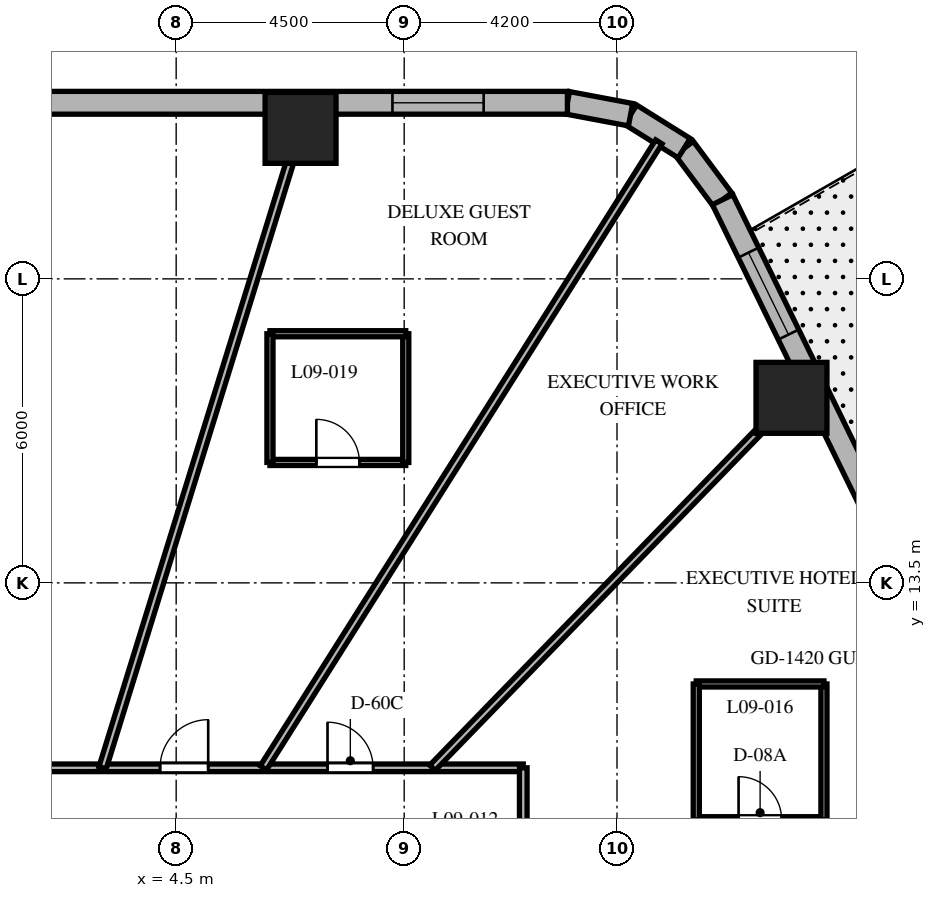
"""IFC4 building model, lengths in metres.
Left out: names, types, materials, properties, quantities, classifications, styles, units other than length and angle.
Written with IfcOpenShell. Run it as: python <this file> out.ifc"""

import sys

from ifc_helpers import new_model, si_unit, direction, frame, frame_2d, origin, origin_2d, place, context, subcontext, project, spatial, rectangle, extrude, element, fill, save


model = new_model("IFC4")
c1 = context("Model", 3, precision=1e-05, world=origin(), true_north=direction((0.0, 1.0)))
c2 = subcontext(c1, "Body", "Model", "MODEL_VIEW")
j1 = project(units=[si_unit("LENGTHUNIT", "METRE"), si_unit("PLANEANGLEUNIT", "RADIAN")], contexts=[c1])
p1 = place(None, origin())
s1 = spatial("IfcSite", under=j1, at=p1, CompositionType="ELEMENT")
p2 = place(p1, origin())
s2 = spatial("IfcBuilding", under=s1, at=p2, CompositionType="ELEMENT")
p3 = place(p2, frame((0.0, 0.0, 45.3)))
s3 = spatial("IfcBuildingStorey", under=s2, at=p3, CompositionType="ELEMENT", Elevation=45.3)
for number, where, z_axis, x_axis in (
    (1, (16.643, 17.152, 0.0), (0.0, 0.0, 1.0), (1.0, 0.0, 0.0)),
    (2, (6.955, 22.48, 0.0), (0.0, 0.0, 1.0), (1.0, 0.0, 0.0)),
):
    element("IfcColumn", number, at=place(p3, frame(where, z_axis=z_axis, x_axis=x_axis)), inside=s3, PredefinedType="COLUMN", context=c2, shape_type="SweptSolid", body=[
        extrude(rectangle(XDim=1.4, YDim=1.4, at=origin_2d()), origin(), (0.0, 0.0, 1.0), 3.7),
    ])
p4 = place(p3, frame((15.284, 21.062, 0.0), z_axis=(0.0, 0.0, 1.0), x_axis=(-0.597595366449, 0.801797841104, 0.0)))
e3 = element("IfcWall", 3, at=p4, inside=s3, PredefinedType="SOLIDWALL", context=c2, shape_type="SweptSolid", body=[
    extrude(rectangle(XDim=1.269, YDim=0.45, at=frame_2d((0.634, 0.0))), origin(), (0.0, 0.0, 1.0), 3.4),
])
p5 = place(p3, frame((14.526, 22.08, 0.0), z_axis=(0.0, 0.0, 1.0), x_axis=(-0.848185203596, 0.529699783275, 0.0)))
e4 = element("IfcWall", 4, at=p5, inside=s3, PredefinedType="SOLIDWALL", context=c2, shape_type="SweptSolid", body=[
    extrude(rectangle(XDim=1.247, YDim=0.45, at=frame_2d((0.624, 0.0))), origin(), (0.0, 0.0, 1.0), 3.4),
])
p6 = place(p3, frame((13.468, 22.74, 0.0), z_axis=(0.0, 0.0, 1.0), x_axis=(-0.982717174228, 0.185113358451, 0.0)))
e5 = element("IfcWall", 5, at=p6, inside=s3, PredefinedType="SOLIDWALL", context=c2, shape_type="SweptSolid", body=[
    extrude(rectangle(XDim=1.269, YDim=0.45, at=frame_2d((0.634, 0.0))), origin(), (0.0, 0.0, 1.0), 3.4),
])
p7 = place(p3, frame((24.336, 2.532, 0.0), z_axis=(0.0, 0.0, 1.0), x_axis=(-0.438931326393, 0.898520612291, 0.0)))
e6 = element("IfcWall", 6, at=p7, inside=s3, PredefinedType="SOLIDWALL", context=c2, shape_type="SweptSolid", body=[
    extrude(rectangle(XDim=20.623, YDim=0.45, at=frame_2d((10.312, 0.0))), origin(), (0.0, 0.0, 1.0), 3.4),
])
p8 = place(p7, frame((5.171, 0.0, 0.0)))
e7 = element("IfcOpeningElement", 7, at=p8, cuts=e6, PredefinedType="OPENING", context=c2, shape_type="SweptSolid", body=[
    extrude(rectangle(XDim=1.0, YDim=2.15, at=frame_2d((0.5, 1.075))), frame((0.0, 0.235, 0.0), z_axis=(0.0, -1.0, 0.0), x_axis=(1.0, 0.0, 0.0)), (0.0, 0.0, 1.0), 0.47),
])
p9 = place(p7, frame((1.214, 0.0, 0.8)))
e8 = element("IfcOpeningElement", 8, at=p9, cuts=e6, PredefinedType="OPENING", context=c2, shape_type="SweptSolid", body=[
    extrude(rectangle(XDim=1.8, YDim=1.8, at=frame_2d((0.9, 0.9))), frame((0.0, 0.235, 0.0), z_axis=(0.0, -1.0, 0.0), x_axis=(1.0, 0.0, 0.0)), (0.0, 0.0, 1.0), 0.47),
])
p10 = place(p7, frame((9.462, 0.0, 0.8)))
e9 = element("IfcOpeningElement", 9, at=p10, cuts=e6, PredefinedType="OPENING", context=c2, shape_type="SweptSolid", body=[
    extrude(rectangle(XDim=1.8, YDim=1.8, at=frame_2d((0.9, 0.9))), frame((0.0, 0.235, 0.0), z_axis=(0.0, -1.0, 0.0), x_axis=(1.0, 0.0, 0.0)), (0.0, 0.0, 1.0), 0.47),
])
p11 = place(p7, frame((17.66, 0.0, 0.8)))
e10 = element("IfcOpeningElement", 10, at=p11, cuts=e6, PredefinedType="OPENING", context=c2, shape_type="SweptSolid", body=[
    extrude(rectangle(XDim=1.8, YDim=1.8, at=frame_2d((0.9, 0.9))), frame((0.0, 0.235, 0.0), z_axis=(0.0, -1.0, 0.0), x_axis=(1.0, 0.0, 0.0)), (0.0, 0.0, 1.0), 0.47),
])
p12 = place(p3, frame((12.221, 22.975, 0.0), z_axis=(0.0, 0.0, 1.0), x_axis=(-1.0, 0.0, 0.0)))
e11 = element("IfcWall", 11, at=p12, inside=s3, PredefinedType="SOLIDWALL", context=c2, shape_type="SweptSolid", body=[
    extrude(rectangle(XDim=26.389, YDim=0.45, at=frame_2d((13.195, 0.0))), origin(), (0.0, 0.0, 1.0), 3.4),
])
p13 = place(p12, frame((1.653, 0.0, 0.8)))
e12 = element("IfcOpeningElement", 12, at=p13, cuts=e11, PredefinedType="OPENING", context=c2, shape_type="SweptSolid", body=[
    extrude(rectangle(XDim=1.8, YDim=1.8, at=frame_2d((0.9, 0.9))), frame((0.0, 0.235, 0.0), z_axis=(0.0, -1.0, 0.0), x_axis=(1.0, 0.0, 0.0)), (0.0, 0.0, 1.0), 0.47),
])
p14 = place(p12, frame((12.296, 0.0, 0.8)))
e13 = element("IfcOpeningElement", 13, at=p14, cuts=e11, PredefinedType="OPENING", context=c2, shape_type="SweptSolid", body=[
    extrude(rectangle(XDim=1.8, YDim=1.8, at=frame_2d((0.9, 0.9))), frame((0.0, 0.235, 0.0), z_axis=(0.0, -1.0, 0.0), x_axis=(1.0, 0.0, 0.0)), (0.0, 0.0, 1.0), 0.47),
])
p15 = place(p12, frame((22.938, 0.0, 0.8)))
e14 = element("IfcOpeningElement", 14, at=p15, cuts=e11, PredefinedType="OPENING", context=c2, shape_type="SweptSolid", body=[
    extrude(rectangle(XDim=1.8, YDim=1.8, at=frame_2d((0.9, 0.9))), frame((0.0, 0.235, 0.0), z_axis=(0.0, -1.0, 0.0), x_axis=(1.0, 0.0, 0.0)), (0.0, 0.0, 1.0), 0.47),
])
p16 = place(p3, frame((-11.35, 9.85, 0.0), z_axis=(0.0, 0.0, 1.0), x_axis=(1.0, 0.0, 0.0)))
e15 = element("IfcWall", 15, at=p16, inside=s3, PredefinedType="PARTITIONING", context=c2, shape_type="SweptSolid", body=[
    extrude(rectangle(XDim=22.7, YDim=0.15, at=frame_2d((11.35, 0.0))), origin(), (0.0, 0.0, 1.0), 2.84),
])
p17 = place(p16, frame((18.837, 0.0, 0.0)))
e16 = element("IfcOpeningElement", 16, at=p17, cuts=e15, PredefinedType="OPENING", context=c2, shape_type="SweptSolid", body=[
    extrude(rectangle(XDim=0.9, YDim=2.03, at=frame_2d((0.45, 1.015))), frame((0.0, 0.085, 0.0), z_axis=(0.0, -1.0, 0.0), x_axis=(1.0, 0.0, 0.0)), (0.0, 0.0, 1.0), 0.17),
])
p18 = place(p16, frame((15.532, 0.0, 0.0)))
e17 = element("IfcOpeningElement", 17, at=p18, cuts=e15, PredefinedType="OPENING", context=c2, shape_type="SweptSolid", body=[
    extrude(rectangle(XDim=0.95, YDim=2.03, at=frame_2d((0.475, 1.015))), frame((0.0, 0.085, 0.0), z_axis=(0.0, -1.0, 0.0), x_axis=(1.0, 0.0, 0.0)), (0.0, 0.0, 1.0), 0.17),
])
p19 = place(p16, frame((10.444, 0.0, 0.0)))
e18 = element("IfcOpeningElement", 18, at=p19, cuts=e15, PredefinedType="OPENING", context=c2, shape_type="SweptSolid", body=[
    extrude(rectangle(XDim=0.95, YDim=2.03, at=frame_2d((0.475, 1.015))), frame((0.0, 0.085, 0.0), z_axis=(0.0, -1.0, 0.0), x_axis=(1.0, 0.0, 0.0)), (0.0, 0.0, 1.0), 0.17),
])
p20 = place(p16, frame((5.252, 0.0, 0.0)))
e19 = element("IfcOpeningElement", 19, at=p20, cuts=e15, PredefinedType="OPENING", context=c2, shape_type="SweptSolid", body=[
    extrude(rectangle(XDim=0.95, YDim=2.03, at=frame_2d((0.475, 1.015))), frame((0.0, 0.085, 0.0), z_axis=(0.0, -1.0, 0.0), x_axis=(1.0, 0.0, 0.0)), (0.0, 0.0, 1.0), 0.17),
])
p21 = place(p16, frame((1.702, 0.0, 0.0)))
e20 = element("IfcOpeningElement", 20, at=p21, cuts=e15, PredefinedType="OPENING", context=c2, shape_type="SweptSolid", body=[
    extrude(rectangle(XDim=0.9, YDim=2.03, at=frame_2d((0.45, 1.015))), frame((0.0, 0.085, 0.0), z_axis=(0.0, -1.0, 0.0), x_axis=(1.0, 0.0, 0.0)), (0.0, 0.0, 1.0), 0.17),
])
p22 = place(p3, frame((11.35, 9.85, 0.0), z_axis=(0.0, 0.0, 1.0), x_axis=(0.0, -1.0, 0.0)))
e21 = element("IfcWall", 21, at=p22, inside=s3, PredefinedType="PARTITIONING", context=c2, shape_type="SweptSolid", body=[
    extrude(rectangle(XDim=19.7, YDim=0.15, at=frame_2d((9.85, 0.0))), origin(), (0.0, 0.0, 1.0), 2.84),
])
p23 = place(p22, frame((7.571, 0.0, 0.0)))
e22 = element("IfcOpeningElement", 22, at=p23, cuts=e21, PredefinedType="OPENING", context=c2, shape_type="SweptSolid", body=[
    extrude(rectangle(XDim=0.95, YDim=2.03, at=frame_2d((0.475, 1.015))), frame((0.0, 0.085, 0.0), z_axis=(0.0, -1.0, 0.0), x_axis=(1.0, 0.0, 0.0)), (0.0, 0.0, 1.0), 0.17),
])
p24 = place(p22, frame((3.024, 0.0, 0.0)))
e23 = element("IfcOpeningElement", 23, at=p24, cuts=e21, PredefinedType="OPENING", context=c2, shape_type="SweptSolid", body=[
    extrude(rectangle(XDim=0.95, YDim=2.03, at=frame_2d((0.475, 1.015))), frame((0.0, 0.085, 0.0), z_axis=(0.0, -1.0, 0.0), x_axis=(1.0, 0.0, 0.0)), (0.0, 0.0, 1.0), 0.17),
])
p25 = place(p22, frame((17.181, 0.0, 0.0)))
e24 = element("IfcOpeningElement", 24, at=p25, cuts=e21, PredefinedType="OPENING", context=c2, shape_type="SweptSolid", body=[
    extrude(rectangle(XDim=0.95, YDim=2.03, at=frame_2d((0.475, 1.015))), frame((0.0, 0.085, 0.0), z_axis=(0.0, -1.0, 0.0), x_axis=(1.0, 0.0, 0.0)), (0.0, 0.0, 1.0), 0.17),
])
p26 = place(p22, frame((13.403, 0.0, 0.0)))
e25 = element("IfcOpeningElement", 25, at=p26, cuts=e21, PredefinedType="OPENING", context=c2, shape_type="SweptSolid", body=[
    extrude(rectangle(XDim=0.95, YDim=2.03, at=frame_2d((0.475, 1.015))), frame((0.0, 0.085, 0.0), z_axis=(0.0, -1.0, 0.0), x_axis=(1.0, 0.0, 0.0)), (0.0, 0.0, 1.0), 0.17),
])
p27 = place(p22, frame((10.134, 0.0, 0.0)))
e26 = element("IfcOpeningElement", 26, at=p27, cuts=e21, PredefinedType="OPENING", context=c2, shape_type="SweptSolid", body=[
    extrude(rectangle(XDim=0.95, YDim=2.03, at=frame_2d((0.475, 1.015))), frame((0.0, 0.085, 0.0), z_axis=(0.0, -1.0, 0.0), x_axis=(1.0, 0.0, 0.0)), (0.0, 0.0, 1.0), 0.17),
])
p28 = place(p3, frame((9.558, 9.85, 0.0), z_axis=(0.0, 0.0, 1.0), x_axis=(0.69638346089, 0.717669893056, 0.0)))
e27 = element("IfcWall", 27, at=p28, inside=s3, PredefinedType="PARTITIONING", context=c2, shape_type="SweptSolid", body=[
    extrude(rectangle(XDim=10.701, YDim=0.15, at=frame_2d((5.351, 0.0))), origin(), (0.0, 0.0, 1.0), 2.54),
])
p29 = place(p3, frame((6.222, 9.85, 0.0), z_axis=(0.0, 0.0, 1.0), x_axis=(0.534069056435, 0.845440857162, 0.0)))
e28 = element("IfcWall", 28, at=p29, inside=s3, PredefinedType="PARTITIONING", context=c2, shape_type="SweptSolid", body=[
    extrude(rectangle(XDim=14.611, YDim=0.15, at=frame_2d((7.306, 0.0))), origin(), (0.0, 0.0, 1.0), 2.54),
])
p30 = place(p3, frame((3.048, 9.85, 0.0), z_axis=(0.0, 0.0, 1.0), x_axis=(0.295553992761, 0.955326037206, 0.0)))
e29 = element("IfcWall", 29, at=p30, inside=s3, PredefinedType="PARTITIONING", context=c2, shape_type="SweptSolid", body=[
    extrude(rectangle(XDim=13.739, YDim=0.15, at=frame_2d((6.869, 0.0))), origin(), (0.0, 0.0, 1.0), 2.54),
])
p31 = place(p3, frame((14.764, 8.825, 0.0), z_axis=(0.0, 0.0, 1.0), x_axis=(1.0, 0.0, 0.0)))
e30 = element("IfcWall", 30, at=p31, inside=s3, PredefinedType="PARTITIONING", context=c2, shape_type="SweptSolid", body=[
    extrude(rectangle(XDim=2.52, YDim=0.12, at=frame_2d((1.26, 0.0))), origin(), (0.0, 0.0, 1.0), 2.927),
])
p32 = place(p31, frame((0.835, 0.0, 0.0)))
e31 = element("IfcOpeningElement", 31, at=p32, cuts=e30, PredefinedType="OPENING", context=c2, shape_type="SweptSolid", body=[
    extrude(rectangle(XDim=0.85, YDim=2.03, at=frame_2d((0.425, 1.015))), frame((0.0, 0.07, 0.0), z_axis=(0.0, -1.0, 0.0), x_axis=(1.0, 0.0, 0.0)), (0.0, 0.0, 1.0), 0.14),
])
p33 = place(p3, frame((17.284, 8.825, 0.0), z_axis=(0.0, 0.0, 1.0), x_axis=(0.0, 1.0, 0.0)))
e32 = element("IfcWall", 32, at=p33, inside=s3, PredefinedType="PARTITIONING", context=c2, shape_type="SweptSolid", body=[
    extrude(rectangle(XDim=2.68, YDim=0.12, at=frame_2d((1.34, 0.0))), origin(), (0.0, 0.0, 1.0), 3.4),
])
p34 = place(p3, frame((17.284, 11.505, 0.0), z_axis=(0.0, 0.0, 1.0), x_axis=(-1.0, 0.0, 0.0)))
e33 = element("IfcWall", 33, at=p34, inside=s3, PredefinedType="PARTITIONING", context=c2, shape_type="SweptSolid", body=[
    extrude(rectangle(XDim=2.52, YDim=0.12, at=frame_2d((1.26, 0.0))), origin(), (0.0, 0.0, 1.0), 2.927),
])
p35 = place(p3, frame((14.764, 11.505, 0.0), z_axis=(0.0, 0.0, 1.0), x_axis=(0.0, -1.0, 0.0)))
e34 = element("IfcWall", 34, at=p35, inside=s3, PredefinedType="PARTITIONING", context=c2, shape_type="SweptSolid", body=[
    extrude(rectangle(XDim=2.68, YDim=0.12, at=frame_2d((1.34, 0.0))), origin(), (0.0, 0.0, 1.0), 3.4),
])
p36 = place(p3, frame((6.351, 15.877, 0.0), z_axis=(0.0, 0.0, 1.0), x_axis=(1.0, 0.0, 0.0)))
e35 = element("IfcWall", 35, at=p36, inside=s3, PredefinedType="PARTITIONING", context=c2, shape_type="SweptSolid", body=[
    extrude(rectangle(XDim=2.68, YDim=0.12, at=frame_2d((1.34, 0.0))), origin(), (0.0, 0.0, 1.0), 2.84),
])
p37 = place(p36, frame((0.915, 0.0, 0.0)))
e36 = element("IfcOpeningElement", 36, at=p37, cuts=e35, PredefinedType="OPENING", context=c2, shape_type="SweptSolid", body=[
    extrude(rectangle(XDim=0.85, YDim=2.03, at=frame_2d((0.425, 1.015))), frame((0.0, 0.07, 0.0), z_axis=(0.0, -1.0, 0.0), x_axis=(1.0, 0.0, 0.0)), (0.0, 0.0, 1.0), 0.14),
])
p38 = place(p3, frame((9.031, 15.877, 0.0), z_axis=(0.0, 0.0, 1.0), x_axis=(0.0, 1.0, 0.0)))
e37 = element("IfcWall", 37, at=p38, inside=s3, PredefinedType="PARTITIONING", context=c2, shape_type="SweptSolid", body=[
    extrude(rectangle(XDim=2.54, YDim=0.12, at=frame_2d((1.27, 0.0))), origin(), (0.0, 0.0, 1.0), 2.972),
])
p39 = place(p3, frame((9.031, 18.417, 0.0), z_axis=(0.0, 0.0, 1.0), x_axis=(-1.0, 0.0, 0.0)))
e38 = element("IfcWall", 38, at=p39, inside=s3, PredefinedType="PARTITIONING", context=c2, shape_type="SweptSolid", body=[
    extrude(rectangle(XDim=2.68, YDim=0.12, at=frame_2d((1.34, 0.0))), origin(), (0.0, 0.0, 1.0), 2.84),
])
p40 = place(p3, frame((6.351, 18.417, 0.0), z_axis=(0.0, 0.0, 1.0), x_axis=(0.0, -1.0, 0.0)))
e39 = element("IfcWall", 39, at=p40, inside=s3, PredefinedType="PARTITIONING", context=c2, shape_type="SweptSolid", body=[
    extrude(rectangle(XDim=2.54, YDim=0.12, at=frame_2d((1.27, 0.0))), origin(), (0.0, 0.0, 1.0), 2.84),
])
p41 = place(p11, origin())
e40 = element("IfcWindow", 40, at=p41, inside=s3, PartitioningType="SINGLE_PANEL", PredefinedType="WINDOW", context=c2, shape_type="SweptSolid", body=[
    extrude(rectangle(XDim=1.8, YDim=1.8, at=frame_2d((0.9, 0.9))), frame((0.0, 0.03, 0.0), z_axis=(0.0, -1.0, 0.0), x_axis=(1.0, 0.0, 0.0)), (0.0, 0.0, 1.0), 0.06),
])
fill(e10, e40)
p42 = place(p13, origin())
e41 = element("IfcWindow", 41, at=p42, inside=s3, PartitioningType="SINGLE_PANEL", PredefinedType="WINDOW", context=c2, shape_type="SweptSolid", body=[
    extrude(rectangle(XDim=1.8, YDim=1.8, at=frame_2d((0.9, 0.9))), frame((0.0, 0.03, 0.0), z_axis=(0.0, -1.0, 0.0), x_axis=(1.0, 0.0, 0.0)), (0.0, 0.0, 1.0), 0.06),
])
fill(e12, e41)
p43 = place(p17, origin())
e42 = element("IfcDoor", 42, at=p43, inside=s3, OperationType="SINGLE_SWING_LEFT", PredefinedType="DOOR", context=c2, shape_type="SweptSolid", body=[
    extrude(rectangle(XDim=0.9, YDim=2.03, at=frame_2d((0.45, 1.015))), frame((0.0, 0.025, 0.0), z_axis=(0.0, -1.0, 0.0), x_axis=(1.0, 0.0, 0.0)), (0.0, 0.0, 1.0), 0.05),
])
fill(e16, e42)
p44 = place(p18, origin())
e43 = element("IfcDoor", 43, at=p44, inside=s3, OperationType="SINGLE_SWING_RIGHT", PredefinedType="DOOR", context=c2, shape_type="SweptSolid", body=[
    extrude(rectangle(XDim=0.95, YDim=2.03, at=frame_2d((0.475, 1.015))), frame((0.0, 0.025, 0.0), z_axis=(0.0, -1.0, 0.0), x_axis=(1.0, 0.0, 0.0)), (0.0, 0.0, 1.0), 0.05),
])
fill(e17, e43)
p45 = place(p37, origin())
e44 = element("IfcDoor", 44, at=p45, inside=s3, OperationType="SINGLE_SWING_LEFT", PredefinedType="DOOR", context=c2, shape_type="SweptSolid", body=[
    extrude(rectangle(XDim=0.85, YDim=2.03, at=frame_2d((0.425, 1.015))), frame((0.0, 0.025, 0.0), z_axis=(0.0, -1.0, 0.0), x_axis=(1.0, 0.0, 0.0)), (0.0, 0.0, 1.0), 0.05),
])
fill(e36, e44)
save(model, sys.argv[1])
